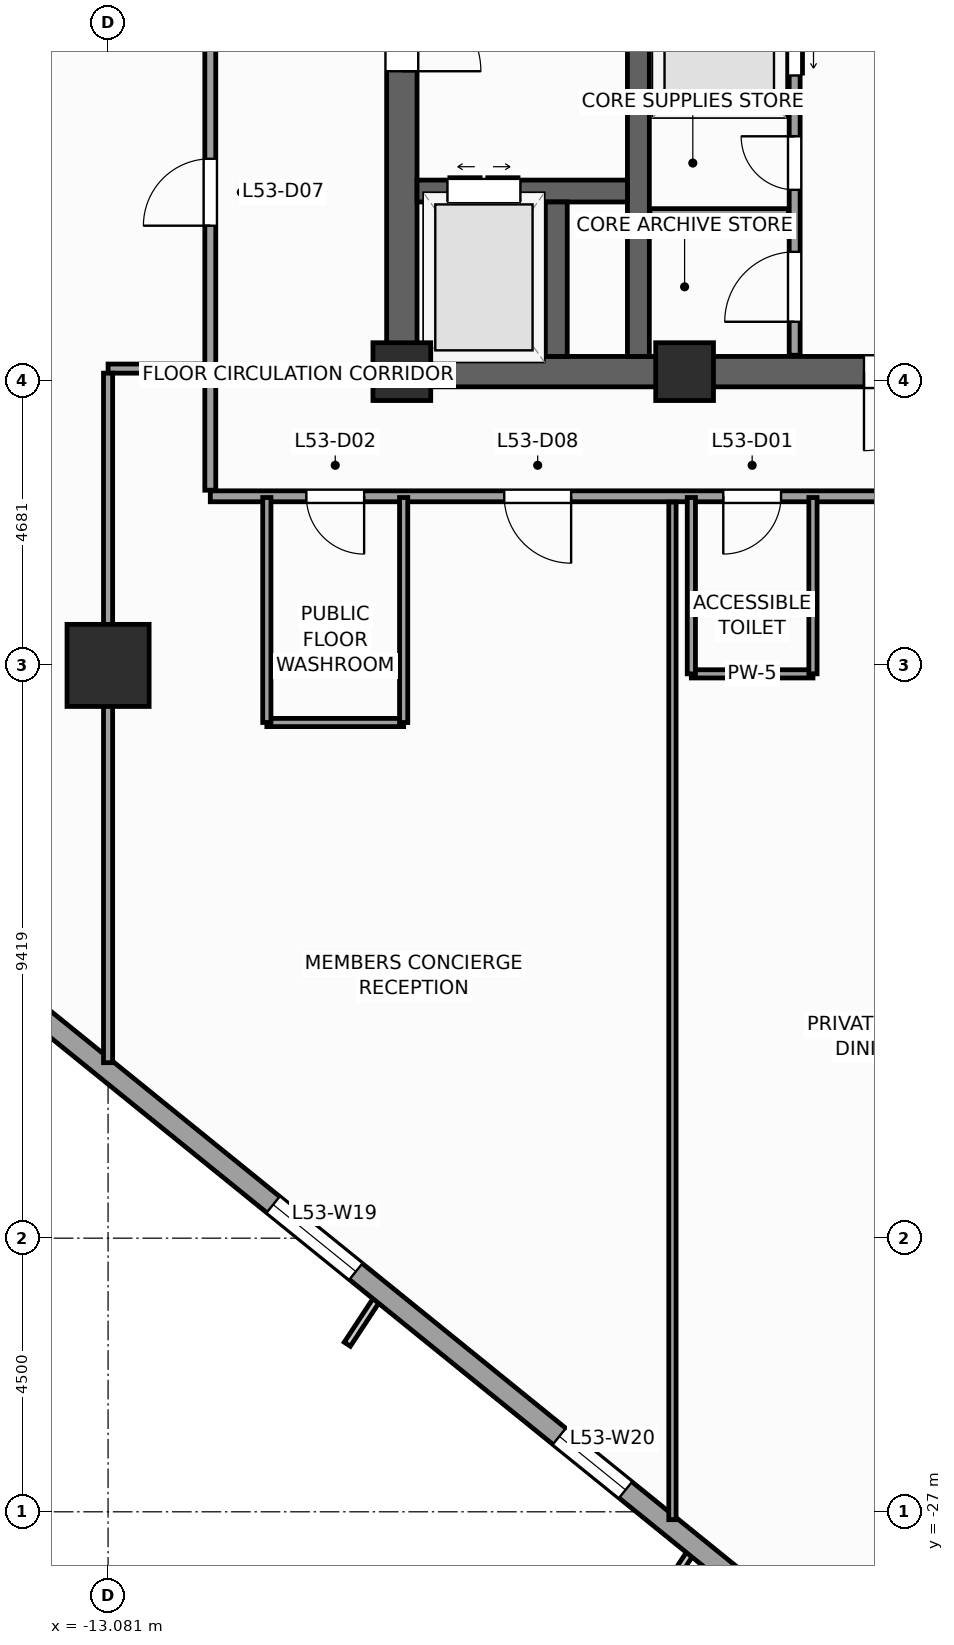
"""IFC4 building model, lengths in metres.
Left out: names, types, materials, properties, quantities, classifications, styles, units other than length and angle.
Written with IfcOpenShell. Run it as: python <this file> out.ifc"""

import sys

from ifc_helpers import new_model, si_unit, direction, frame, frame_2d, origin, origin_2d, place, context, subcontext, project, spatial, rectangle, extrude, source, transform, mapped, element, fill, save


model = new_model("IFC4")
c1 = context("Model", 3, precision=1e-05, world=origin(), true_north=direction((0.0, 1.0)))
c2 = subcontext(c1, "Body", "Model", "MODEL_VIEW")
j1 = project(units=[si_unit("LENGTHUNIT", "METRE"), si_unit("PLANEANGLEUNIT", "RADIAN")], contexts=[c1])
p1 = place(None, origin())
s1 = spatial("IfcSite", under=j1, at=p1, CompositionType="ELEMENT")
p2 = place(p1, origin())
s2 = spatial("IfcBuilding", under=s1, at=p2, CompositionType="ELEMENT")
p3 = place(p2, frame((0.0, 0.0, 221.2)))
s3 = spatial("IfcBuildingStorey", under=s2, at=p3, CompositionType="ELEMENT", Elevation=221.2)
p4 = place(p3, frame((-8.5, -8.25, 0.0), z_axis=(0.0, 0.0, 1.0), x_axis=(1.0, 0.0, 0.0)))
e1 = element("IfcWall", 1, at=p4, inside=s3, PredefinedType="SHEAR", context=c2, shape_type="SweptSolid", body=[
    extrude(rectangle(XDim=17.0, YDim=0.5, at=frame_2d((8.5, 0.0))), origin(), (0.0, 0.0, 1.0), 3.9),
])
p5 = place(p4, frame((7.85, 0.0, 0.0)))
e2 = element("IfcOpeningElement", 2, at=p5, cuts=e1, PredefinedType="OPENING", context=c2, shape_type="SweptSolid", body=[
    extrude(rectangle(XDim=1.3, YDim=2.2, at=frame_2d((0.65, 1.1))), frame((0.0, 0.26, 0.0), z_axis=(0.0, -1.0, 0.0), x_axis=(1.0, 0.0, 0.0)), (0.0, 0.0, 1.0), 0.52),
])
p6 = place(p3, frame((-8.25, -8.0, 0.0), z_axis=(0.0, 0.0, 1.0), x_axis=(0.0, 1.0, 0.0)))
e3 = element("IfcWall", 3, at=p6, inside=s3, PredefinedType="SHEAR", context=c2, shape_type="SweptSolid", body=[
    extrude(rectangle(XDim=16.0, YDim=0.5, at=frame_2d((8.0, 0.0))), origin(), (0.0, 0.0, 1.0), 3.9),
])
p7 = place(p6, frame((4.69, 0.0, 0.0)))
e4 = element("IfcOpeningElement", 4, at=p7, cuts=e3, PredefinedType="OPENING", context=c2, shape_type="SweptSolid", body=[
    extrude(rectangle(XDim=1.3, YDim=2.2, at=frame_2d((0.65, 1.1))), frame((0.0, 0.26, 0.0), z_axis=(0.0, -1.0, 0.0), x_axis=(1.0, 0.0, 0.0)), (0.0, 0.0, 1.0), 0.52),
])
p8 = place(p3, frame((-4.36, -8.0, 0.0), z_axis=(0.0, 0.0, 1.0), x_axis=(0.0, 1.0, 0.0)))
e5 = element("IfcWall", 5, at=p8, inside=s3, PredefinedType="SHEAR", context=c2, shape_type="SweptSolid", body=[
    extrude(rectangle(XDim=16.0, YDim=0.36, at=frame_2d((8.0, 0.0))), origin(), (0.0, 0.0, 1.0), 3.9),
])
p9 = place(p3, frame((-8.0, -5.28, 0.0), z_axis=(0.0, 0.0, 1.0), x_axis=(1.0, 0.0, 0.0)))
e6 = element("IfcWall", 6, at=p9, inside=s3, PredefinedType="SHEAR", context=c2, shape_type="SweptSolid", body=[
    extrude(rectangle(XDim=3.46, YDim=0.36, at=frame_2d((1.73, 0.0))), origin(), (0.0, 0.0, 1.0), 3.9),
])
p10 = place(p9, frame((0.5, 0.0, 0.0)))
e7 = element("IfcOpeningElement", 7, at=p10, cuts=e6, PredefinedType="OPENING", context=c2, shape_type="SweptSolid", body=[
    extrude(rectangle(XDim=1.2, YDim=2.25, at=frame_2d((0.6, 1.125))), frame((0.0, 0.19, 0.0), z_axis=(0.0, -1.0, 0.0), x_axis=(1.0, 0.0, 0.0)), (0.0, 0.0, 1.0), 0.38),
])
p11 = place(p3, frame((-5.71, -8.0, 0.0), z_axis=(0.0, 0.0, 1.0), x_axis=(0.0, 1.0, 0.0)))
e8 = element("IfcWall", 8, at=p11, inside=s3, PredefinedType="SHEAR", context=c2, shape_type="SweptSolid", body=[
    extrude(rectangle(XDim=2.54, YDim=0.36, at=frame_2d((1.27, 0.0))), origin(), (0.0, 0.0, 1.0), 3.9),
])
m1 = source(origin(), c2, "Body", "SweptSolid", [
    extrude(rectangle(XDim=0.95, YDim=0.95, at=origin_2d()), origin(), (0.0, 0.0, 1.0), 3.9),
])
for number, where, z_axis, x_axis in (
    (9, (-8.25, -8.25, 0.0), (0.0, 0.0, 1.0), (1.0, 0.0, 0.0)),
    (10, (-3.6, -8.25, 0.0), (0.0, 0.0, 1.0), (1.0, 0.0, 0.0)),
):
    element("IfcColumn", number, at=place(p3, frame(where, z_axis=z_axis, x_axis=x_axis)), inside=s3, PredefinedType="PILASTER", context=c2, shape_type="MappedRepresentation", body=[
        mapped(m1, transform((0.0, 0.0, 0.0), scale=1.0)),
    ])
m2 = source(origin(), c2, "Body", "SweptSolid", [
    extrude(rectangle(XDim=1.35, YDim=1.35, at=origin_2d()), origin(), (0.0, 0.0, 1.0), 3.9),
])
p12 = place(p3, frame((-13.081, -13.081, 0.0), z_axis=(0.0, 0.0, 1.0), x_axis=(1.0, 0.0, 0.0)))
e11 = element("IfcColumn", 11, at=p12, inside=s3, PredefinedType="COLUMN", context=c2, shape_type="MappedRepresentation", body=[
    mapped(m2, transform((0.0, 0.0, 0.0), scale=1.0)),
])
p13 = place(p3, frame((-29.154, -6.733, 0.0), z_axis=(0.0, 0.0, 1.0), x_axis=(0.77714192302, -0.629325378072, 0.0)))
e12 = element("IfcWall", 12, at=p13, inside=s3, PredefinedType="STANDARD", context=c2, shape_type="SweptSolid", body=[
    extrude(rectangle(XDim=36.84, YDim=0.34, at=frame_2d((18.42, 0.0))), origin(), (0.0, 0.0, 1.0), 2.96),
])
p14 = place(p13, frame((3.721, 0.0, 0.48)))
e13 = element("IfcOpeningElement", 13, at=p14, cuts=e12, PredefinedType="OPENING", context=c2, shape_type="SweptSolid", body=[
    extrude(rectangle(XDim=1.4, YDim=2.4, at=frame_2d((0.7, 1.2))), frame((0.0, 0.18, 0.0), z_axis=(0.0, -1.0, 0.0), x_axis=(1.0, 0.0, 0.0)), (0.0, 0.0, 1.0), 0.36),
])
p15 = place(p13, frame((9.809, 0.0, 0.58)))
e14 = element("IfcOpeningElement", 14, at=p15, cuts=e12, PredefinedType="OPENING", context=c2, shape_type="SweptSolid", body=[
    extrude(rectangle(XDim=1.75, YDim=2.3, at=frame_2d((0.875, 1.15))), frame((0.0, 0.18, 0.0), z_axis=(0.0, -1.0, 0.0), x_axis=(1.0, 0.0, 0.0)), (0.0, 0.0, 1.0), 0.36),
])
p16 = place(p13, frame((16.058, 0.0, 0.58)))
e15 = element("IfcOpeningElement", 15, at=p16, cuts=e12, PredefinedType="OPENING", context=c2, shape_type="SweptSolid", body=[
    extrude(rectangle(XDim=1.75, YDim=2.3, at=frame_2d((0.875, 1.15))), frame((0.0, 0.18, 0.0), z_axis=(0.0, -1.0, 0.0), x_axis=(1.0, 0.0, 0.0)), (0.0, 0.0, 1.0), 0.36),
])
p17 = place(p13, frame((24.176, 0.0, 0.58)))
e16 = element("IfcOpeningElement", 16, at=p17, cuts=e12, PredefinedType="OPENING", context=c2, shape_type="SweptSolid", body=[
    extrude(rectangle(XDim=1.75, YDim=2.3, at=frame_2d((0.875, 1.15))), frame((0.0, 0.18, 0.0), z_axis=(0.0, -1.0, 0.0), x_axis=(1.0, 0.0, 0.0)), (0.0, 0.0, 1.0), 0.36),
])
p18 = place(p13, frame((30.232, 0.0, 0.48)))
e17 = element("IfcOpeningElement", 17, at=p18, cuts=e12, PredefinedType="OPENING", context=c2, shape_type="SweptSolid", body=[
    extrude(rectangle(XDim=1.4, YDim=2.4, at=frame_2d((0.7, 1.2))), frame((0.0, 0.18, 0.0), z_axis=(0.0, -1.0, 0.0), x_axis=(1.0, 0.0, 0.0)), (0.0, 0.0, 1.0), 0.36),
])
p19 = place(p3, frame((-0.789, -29.703, 0.0), z_axis=(0.0, 0.0, 1.0), x_axis=(0.629323365087, 0.77714355312, 0.0)))
e18 = element("IfcWall", 18, at=p19, inside=s3, PredefinedType="STANDARD", context=c2, shape_type="SweptSolid", body=[
    extrude(rectangle(XDim=5.5, YDim=0.34, at=frame_2d((2.75, 0.0))), origin(), (0.0, 0.0, 1.0), 3.66),
])
p20 = place(p3, frame((-1.79, -7.98, 0.0), z_axis=(0.0, 0.0, 1.0), x_axis=(0.0, 1.0, 0.0)))
e19 = element("IfcWall", 19, at=p20, inside=s3, PredefinedType="PARTITIONING", context=c2, shape_type="SweptSolid", body=[
    extrude(rectangle(XDim=12.38, YDim=0.18, at=frame_2d((6.19, 0.0))), origin(), (0.0, 0.0, 1.0), 3.66),
])
p21 = place(p20, frame((4.6, 0.0, 0.0)))
e20 = element("IfcOpeningElement", 20, at=p21, cuts=e19, PredefinedType="OPENING", context=c2, shape_type="SweptSolid", body=[
    extrude(rectangle(XDim=1.1, YDim=2.2, at=frame_2d((0.55, 1.1))), frame((0.0, 0.1, 0.0), z_axis=(0.0, -1.0, 0.0), x_axis=(1.0, 0.0, 0.0)), (0.0, 0.0, 1.0), 0.2),
])
p22 = place(p20, frame((6.66, 0.0, 0.0)))
e21 = element("IfcOpeningElement", 21, at=p22, cuts=e19, PredefinedType="OPENING", context=c2, shape_type="SweptSolid", body=[
    extrude(rectangle(XDim=1.1, YDim=2.2, at=frame_2d((0.55, 1.1))), frame((0.0, 0.1, 0.0), z_axis=(0.0, -1.0, 0.0), x_axis=(1.0, 0.0, 0.0)), (0.0, 0.0, 1.0), 0.2),
])
p23 = place(p20, frame((0.55, 0.0, 0.0)))
e22 = element("IfcOpeningElement", 22, at=p23, cuts=e19, PredefinedType="OPENING", context=c2, shape_type="SweptSolid", body=[
    extrude(rectangle(XDim=1.15, YDim=2.25, at=frame_2d((0.575, 1.125))), frame((0.0, 0.1, 0.0), z_axis=(0.0, -1.0, 0.0), x_axis=(1.0, 0.0, 0.0)), (0.0, 0.0, 1.0), 0.2),
])
p24 = place(p20, frame((2.72, 0.0, 0.0)))
e23 = element("IfcOpeningElement", 23, at=p24, cuts=e19, PredefinedType="OPENING", context=c2, shape_type="SweptSolid", body=[
    extrude(rectangle(XDim=0.88, YDim=2.1, at=frame_2d((0.44, 1.05))), frame((0.0, 0.1, 0.0), z_axis=(0.0, -1.0, 0.0), x_axis=(1.0, 0.0, 0.0)), (0.0, 0.0, 1.0), 0.2),
])
p25 = place(p3, frame((-4.17, -3.9, 0.0), z_axis=(0.0, 0.0, 1.0), x_axis=(1.0, 0.0, 0.0)))
e24 = element("IfcWall", 24, at=p25, inside=s3, PredefinedType="PARTITIONING", context=c2, shape_type="SweptSolid", body=[
    extrude(rectangle(XDim=2.28, YDim=0.18, at=frame_2d((1.14, 0.0))), origin(), (0.0, 0.0, 1.0), 3.66),
])
p26 = place(p3, frame((-4.17, -5.65, 0.0), z_axis=(0.0, 0.0, 1.0), x_axis=(1.0, 0.0, 0.0)))
e25 = element("IfcWall", 25, at=p26, inside=s3, PredefinedType="PARTITIONING", context=c2, shape_type="SweptSolid", body=[
    extrude(rectangle(XDim=2.28, YDim=0.16, at=frame_2d((1.14, 0.0))), origin(), (0.0, 0.0, 1.0), 3.66),
])
p27 = place(p3, frame((-11.4, -10.3, 0.0), z_axis=(0.0, 0.0, 1.0), x_axis=(1.0, 0.0, 0.0)))
e26 = element("IfcWall", 26, at=p27, inside=s3, PredefinedType="PARTITIONING", context=c2, shape_type="SweptSolid", body=[
    extrude(rectangle(XDim=22.75, YDim=0.18, at=frame_2d((11.375, 0.0))), origin(), (0.0, 0.0, 1.0), 3.66),
])
p28 = place(p27, frame((8.436, 0.0, 0.0)))
e27 = element("IfcOpeningElement", 27, at=p28, cuts=e26, PredefinedType="OPENING", context=c2, shape_type="SweptSolid", body=[
    extrude(rectangle(XDim=0.95, YDim=2.1, at=frame_2d((0.475, 1.05))), frame((0.0, 0.1, 0.0), z_axis=(0.0, -1.0, 0.0), x_axis=(1.0, 0.0, 0.0)), (0.0, 0.0, 1.0), 0.2),
])
p29 = place(p27, frame((1.58, 0.0, 0.0)))
e28 = element("IfcOpeningElement", 28, at=p29, cuts=e26, PredefinedType="OPENING", context=c2, shape_type="SweptSolid", body=[
    extrude(rectangle(XDim=0.95, YDim=2.1, at=frame_2d((0.475, 1.05))), frame((0.0, 0.1, 0.0), z_axis=(0.0, -1.0, 0.0), x_axis=(1.0, 0.0, 0.0)), (0.0, 0.0, 1.0), 0.2),
])
p30 = place(p27, frame((4.834, 0.0, 0.0)))
e29 = element("IfcOpeningElement", 29, at=p30, cuts=e26, PredefinedType="OPENING", context=c2, shape_type="SweptSolid", body=[
    extrude(rectangle(XDim=1.1, YDim=2.2, at=frame_2d((0.55, 1.1))), frame((0.0, 0.1, 0.0), z_axis=(0.0, -1.0, 0.0), x_axis=(1.0, 0.0, 0.0)), (0.0, 0.0, 1.0), 0.2),
])
p31 = place(p27, frame((12.0, 0.0, 0.0)))
e30 = element("IfcOpeningElement", 30, at=p31, cuts=e26, PredefinedType="OPENING", context=c2, shape_type="SweptSolid", body=[
    extrude(rectangle(XDim=1.1, YDim=2.2, at=frame_2d((0.55, 1.1))), frame((0.0, 0.1, 0.0), z_axis=(0.0, -1.0, 0.0), x_axis=(1.0, 0.0, 0.0)), (0.0, 0.0, 1.0), 0.2),
])
p32 = place(p27, frame((18.041, 0.0, 0.0)))
e31 = element("IfcOpeningElement", 31, at=p32, cuts=e26, PredefinedType="OPENING", context=c2, shape_type="SweptSolid", body=[
    extrude(rectangle(XDim=1.1, YDim=2.2, at=frame_2d((0.55, 1.1))), frame((0.0, 0.1, 0.0), z_axis=(0.0, -1.0, 0.0), x_axis=(1.0, 0.0, 0.0)), (0.0, 0.0, 1.0), 0.2),
])
p33 = place(p3, frame((-11.4, -10.2, 0.0), z_axis=(0.0, 0.0, 1.0), x_axis=(0.0, 1.0, 0.0)))
e32 = element("IfcWall", 32, at=p33, inside=s3, PredefinedType="PARTITIONING", context=c2, shape_type="SweptSolid", body=[
    extrude(rectangle(XDim=14.0, YDim=0.18, at=frame_2d((7.0, 0.0))), origin(), (0.0, 0.0, 1.0), 3.66),
])
p34 = place(p33, frame((11.96, 0.0, 0.0)))
e33 = element("IfcOpeningElement", 33, at=p34, cuts=e32, PredefinedType="OPENING", context=c2, shape_type="SweptSolid", body=[
    extrude(rectangle(XDim=1.1, YDim=2.2, at=frame_2d((0.55, 1.1))), frame((0.0, 0.1, 0.0), z_axis=(0.0, -1.0, 0.0), x_axis=(1.0, 0.0, 0.0)), (0.0, 0.0, 1.0), 0.2),
])
p35 = place(p33, frame((9.025, 0.0, 0.0)))
e34 = element("IfcOpeningElement", 34, at=p35, cuts=e32, PredefinedType="OPENING", context=c2, shape_type="SweptSolid", body=[
    extrude(rectangle(XDim=1.1, YDim=2.2, at=frame_2d((0.55, 1.1))), frame((0.0, 0.1, 0.0), z_axis=(0.0, -1.0, 0.0), x_axis=(1.0, 0.0, 0.0)), (0.0, 0.0, 1.0), 0.2),
])
p36 = place(p33, frame((4.35, 0.0, 0.0)))
e35 = element("IfcOpeningElement", 35, at=p36, cuts=e32, PredefinedType="OPENING", context=c2, shape_type="SweptSolid", body=[
    extrude(rectangle(XDim=1.1, YDim=2.2, at=frame_2d((0.55, 1.1))), frame((0.0, 0.1, 0.0), z_axis=(0.0, -1.0, 0.0), x_axis=(1.0, 0.0, 0.0)), (0.0, 0.0, 1.0), 0.2),
])
p37 = place(p3, frame((-11.495, -8.2, 0.0), z_axis=(0.0, 0.0, 1.0), x_axis=(-1.0, 0.0, 0.0)))
e36 = element("IfcWall", 36, at=p37, inside=s3, PredefinedType="PARTITIONING", context=c2, shape_type="SweptSolid", body=[
    extrude(rectangle(XDim=1.586, YDim=0.15, at=frame_2d((0.793, 0.0))), origin(), (0.0, 0.0, 1.0), 3.66),
])
p38 = place(p3, frame((-13.081, -8.275, 0.0), z_axis=(0.0, 0.0, 1.0), x_axis=(0.0, -1.0, 0.0)))
e37 = element("IfcWall", 37, at=p38, inside=s3, PredefinedType="PARTITIONING", context=c2, shape_type="SweptSolid", body=[
    extrude(rectangle(XDim=11.339, YDim=0.15, at=frame_2d((5.669, 0.0))), origin(), (0.0, 0.0, 1.0), 2.76),
])
p39 = place(p3, frame((-3.8, -27.129, 0.0), z_axis=(0.0, 0.0, 1.0), x_axis=(0.0, 1.0, 0.0)))
e38 = element("IfcWall", 38, at=p39, inside=s3, PredefinedType="PARTITIONING", context=c2, shape_type="SweptSolid", body=[
    extrude(rectangle(XDim=16.734, YDim=0.12, at=frame_2d((8.367, 0.0))), origin(), (0.0, 0.0, 1.0), 3.66),
])
p40 = place(p3, frame((-3.489, -13.22, 0.0), z_axis=(0.0, 0.0, 1.0), x_axis=(1.0, 0.0, 0.0)))
e39 = element("IfcWall", 39, at=p40, inside=s3, PredefinedType="PARTITIONING", context=c2, shape_type="SweptSolid", body=[
    extrude(rectangle(XDim=2.0, YDim=0.135, at=frame_2d((1.0, 0.0))), origin(), (0.0, 0.0, 1.0), 2.76),
])
for number, where, z_axis, x_axis in (
    (40, (-1.489, -13.22, 0.0), (0.0, 0.0, 1.0), (0.0, 1.0, 0.0)),
    (41, (-3.489, -13.22, 0.0), (0.0, 0.0, 1.0), (0.0, 1.0, 0.0)),
):
    element("IfcWall", number, at=place(p3, frame(where, z_axis=z_axis, x_axis=x_axis)), inside=s3, PredefinedType="PARTITIONING", context=c2, shape_type="SweptSolid", body=[
        extrude(rectangle(XDim=2.9, YDim=0.135, at=frame_2d((1.45, 0.0))), origin(), (0.0, 0.0, 1.0), 3.66),
    ])
p41 = place(p3, frame((-10.47, -14.02, 0.0), z_axis=(0.0, 0.0, 1.0), x_axis=(1.0, 0.0, 0.0)))
e42 = element("IfcWall", 42, at=p41, inside=s3, PredefinedType="PARTITIONING", context=c2, shape_type="SweptSolid", body=[
    extrude(rectangle(XDim=2.25, YDim=0.135, at=frame_2d((1.125, 0.0))), origin(), (0.0, 0.0, 1.0), 3.66),
])
for number, where, z_axis, x_axis in (
    (43, (-8.22, -14.02, 0.0), (0.0, 0.0, 1.0), (0.0, 1.0, 0.0)),
    (44, (-10.47, -14.02, 0.0), (0.0, 0.0, 1.0), (0.0, 1.0, 0.0)),
):
    element("IfcWall", number, at=place(p3, frame(where, z_axis=z_axis, x_axis=x_axis)), inside=s3, PredefinedType="PARTITIONING", context=c2, shape_type="SweptSolid", body=[
        extrude(rectangle(XDim=3.7, YDim=0.135, at=frame_2d((1.85, 0.0))), origin(), (0.0, 0.0, 1.0), 3.66),
    ])
m3 = source(origin(), c2, "Body", "SweptSolid", [
    extrude(rectangle(XDim=1.75, YDim=2.3, at=frame_2d((0.875, 1.15))), frame((0.0, 0.03, 0.0), z_axis=(0.0, -1.0, 0.0), x_axis=(1.0, 0.0, 0.0)), (0.0, 0.0, 1.0), 0.06),
])
p42 = place(p17, origin())
e45 = element("IfcWindow", 45, at=p42, inside=s3, PartitioningType="SINGLE_PANEL", PredefinedType="WINDOW", context=c2, shape_type="MappedRepresentation", body=[
    mapped(m3, transform((0.0, 0.0, 0.0), scale=1.0)),
])
fill(e16, e45)
m4 = source(origin(), c2, "Body", "SweptSolid", [
    extrude(rectangle(XDim=1.4, YDim=2.4, at=frame_2d((0.7, 1.2))), frame((0.0, 0.03, 0.0), z_axis=(0.0, -1.0, 0.0), x_axis=(1.0, 0.0, 0.0)), (0.0, 0.0, 1.0), 0.06),
])
p43 = place(p18, origin())
e46 = element("IfcWindow", 46, at=p43, inside=s3, PartitioningType="SINGLE_PANEL", PredefinedType="WINDOW", context=c2, shape_type="MappedRepresentation", body=[
    mapped(m4, transform((0.0, 0.0, 0.0), scale=1.0)),
])
fill(e17, e46)
m5 = source(origin(), c2, "Body", "SweptSolid", [
    extrude(rectangle(XDim=1.3, YDim=2.2, at=frame_2d((0.65, 1.1))), frame((0.0, 0.025, 0.0), z_axis=(0.0, -1.0, 0.0), x_axis=(1.0, 0.0, 0.0)), (0.0, 0.0, 1.0), 0.05),
])
p44 = place(p7, frame((1.3, 0.0, 0.0), z_axis=(0.0, 0.0, 1.0), x_axis=(-1.0, 0.0, 0.0)))
e47 = element("IfcDoor", 47, at=p44, inside=s3, OperationType="SINGLE_SWING_LEFT", PredefinedType="DOOR", context=c2, shape_type="MappedRepresentation", body=[
    mapped(m5, transform((0.0, 0.0, 0.0), scale=1.0)),
])
fill(e4, e47)
p45 = place(p5, frame((1.3, 0.0, 0.0), z_axis=(0.0, 0.0, 1.0), x_axis=(-1.0, 0.0, 0.0)))
e48 = element("IfcDoor", 48, at=p45, inside=s3, OperationType="SINGLE_SWING_LEFT", PredefinedType="DOOR", context=c2, shape_type="MappedRepresentation", body=[
    mapped(m5, transform((0.0, 0.0, 0.0), scale=1.0)),
])
fill(e2, e48)
m6 = source(origin(), c2, "Body", "SweptSolid", [
    extrude(rectangle(XDim=1.2, YDim=2.25, at=frame_2d((0.6, 1.125))), frame((0.0, 0.025, 0.0), z_axis=(0.0, -1.0, 0.0), x_axis=(1.0, 0.0, 0.0)), (0.0, 0.0, 1.0), 0.05),
])
p46 = place(p10, origin())
e49 = element("IfcDoor", 49, at=p46, inside=s3, OperationType="DOUBLE_DOOR_SLIDING", PredefinedType="DOOR", context=c2, shape_type="MappedRepresentation", body=[
    mapped(m6, transform((0.0, 0.0, 0.0), scale=1.0)),
])
fill(e7, e49)
m7 = source(origin(), c2, "Body", "SweptSolid", [
    extrude(rectangle(XDim=1.1, YDim=2.2, at=frame_2d((0.55, 1.1))), frame((0.0, 0.025, 0.0), z_axis=(0.0, -1.0, 0.0), x_axis=(1.0, 0.0, 0.0)), (0.0, 0.0, 1.0), 0.05),
])
p47 = place(p21, frame((1.1, 0.0, 0.0), z_axis=(0.0, 0.0, 1.0), x_axis=(-1.0, 0.0, 0.0)))
e50 = element("IfcDoor", 50, at=p47, inside=s3, OperationType="DOUBLE_DOOR_SLIDING", PredefinedType="DOOR", context=c2, shape_type="MappedRepresentation", body=[
    mapped(m7, transform((0.0, 0.0, 0.0), scale=1.0)),
])
fill(e20, e50)
m8 = source(origin(), c2, "Body", "SweptSolid", [
    extrude(rectangle(XDim=1.15, YDim=2.25, at=frame_2d((0.575, 1.125))), frame((0.0, 0.025, 0.0), z_axis=(0.0, -1.0, 0.0), x_axis=(1.0, 0.0, 0.0)), (0.0, 0.0, 1.0), 0.05),
])
p48 = place(p23, origin())
e51 = element("IfcDoor", 51, at=p48, inside=s3, OperationType="SINGLE_SWING_LEFT", PredefinedType="DOOR", context=c2, shape_type="MappedRepresentation", body=[
    mapped(m8, transform((0.0, 0.0, 0.0), scale=1.0)),
])
fill(e22, e51)
m9 = source(origin(), c2, "Body", "SweptSolid", [
    extrude(rectangle(XDim=0.88, YDim=2.1, at=frame_2d((0.44, 1.05))), frame((0.0, 0.025, 0.0), z_axis=(0.0, -1.0, 0.0), x_axis=(1.0, 0.0, 0.0)), (0.0, 0.0, 1.0), 0.05),
])
p49 = place(p24, origin())
e52 = element("IfcDoor", 52, at=p49, inside=s3, OperationType="SINGLE_SWING_RIGHT", PredefinedType="DOOR", context=c2, shape_type="MappedRepresentation", body=[
    mapped(m9, transform((0.0, 0.0, 0.0), scale=1.0)),
])
fill(e23, e52)
m10 = source(origin(), c2, "Body", "SweptSolid", [
    extrude(rectangle(XDim=0.95, YDim=2.1, at=frame_2d((0.475, 1.05))), frame((0.0, 0.025, 0.0), z_axis=(0.0, -1.0, 0.0), x_axis=(1.0, 0.0, 0.0)), (0.0, 0.0, 1.0), 0.05),
])
p50 = place(p28, frame((0.95, 0.0, 0.0), z_axis=(0.0, 0.0, 1.0), x_axis=(-1.0, 0.0, 0.0)))
e53 = element("IfcDoor", 53, at=p50, inside=s3, OperationType="SINGLE_SWING_LEFT", PredefinedType="DOOR", context=c2, shape_type="MappedRepresentation", body=[
    mapped(m10, transform((0.0, 0.0, 0.0), scale=1.0)),
])
fill(e27, e53)
p51 = place(p29, frame((0.95, 0.0, 0.0), z_axis=(0.0, 0.0, 1.0), x_axis=(-1.0, 0.0, 0.0)))
e54 = element("IfcDoor", 54, at=p51, inside=s3, OperationType="SINGLE_SWING_RIGHT", PredefinedType="DOOR", context=c2, shape_type="MappedRepresentation", body=[
    mapped(m10, transform((0.0, 0.0, 0.0), scale=1.0)),
])
fill(e28, e54)
p52 = place(p36, origin())
e55 = element("IfcDoor", 55, at=p52, inside=s3, OperationType="SINGLE_SWING_LEFT", PredefinedType="DOOR", context=c2, shape_type="MappedRepresentation", body=[
    mapped(m7, transform((0.0, 0.0, 0.0), scale=1.0)),
])
fill(e35, e55)
p53 = place(p30, frame((1.1, 0.0, 0.0), z_axis=(0.0, 0.0, 1.0), x_axis=(-1.0, 0.0, 0.0)))
e56 = element("IfcDoor", 56, at=p53, inside=s3, OperationType="SINGLE_SWING_RIGHT", PredefinedType="DOOR", context=c2, shape_type="MappedRepresentation", body=[
    mapped(m7, transform((0.0, 0.0, 0.0), scale=1.0)),
])
fill(e29, e56)
save(model, sys.argv[1])
